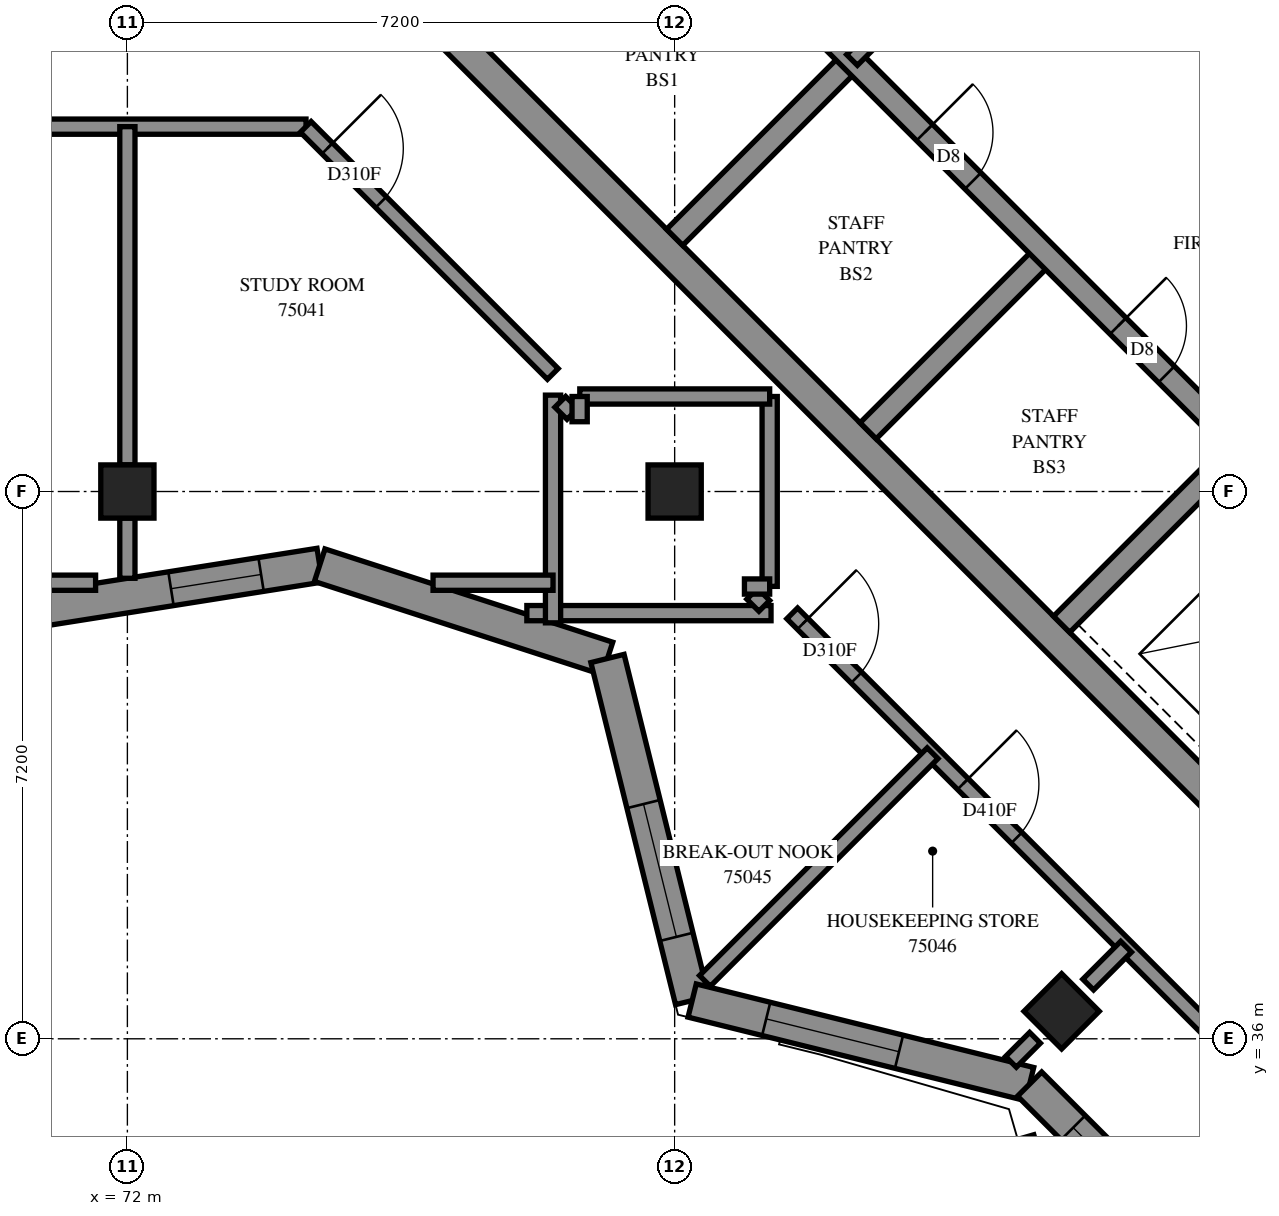
"""IFC4 building model, lengths in metres.
Left out: names, types, materials, properties, quantities, classifications, styles, units other than length and angle.
Written with IfcOpenShell. Run it as: python <this file> out.ifc"""

import sys

from ifc_helpers import new_model, si_unit, direction, frame, frame_2d, origin, origin_2d, place, context, subcontext, project, spatial, polyline, rectangle, outline, extrude, element, fill, save


model = new_model("IFC4")
c1 = context("Model", 3, precision=1e-05, world=origin(), true_north=direction((0.0, 1.0)))
c2 = subcontext(c1, "Body", "Model", "MODEL_VIEW")
j1 = project(units=[si_unit("LENGTHUNIT", "METRE"), si_unit("PLANEANGLEUNIT", "RADIAN")], contexts=[c1])
p1 = place(None, origin())
s1 = spatial("IfcSite", under=j1, at=p1, CompositionType="ELEMENT")
p2 = place(p1, origin())
s2 = spatial("IfcBuilding", under=s1, at=p2, CompositionType="ELEMENT")
p3 = place(p2, frame((0.0, 0.0, 274.4)))
s3 = spatial("IfcBuildingStorey", under=s2, at=p3, CompositionType="ELEMENT", Elevation=274.4)
for number, where, z_axis, x_axis in (
    (1, (72.0, 43.2, 0.0), (0.0, 0.0, 1.0), (1.0, 0.0, 0.0)),
    (2, (79.2, 43.2, 0.0), (0.0, 0.0, 1.0), (1.0, 0.0, 0.0)),
    (3, (84.291, 36.362, 0.0), (0.0, 0.0, 1.0), (0.707, -0.707, 0.0)),
):
    element("IfcColumn", number, at=place(p3, frame(where, z_axis=z_axis, x_axis=x_axis)), inside=s3, PredefinedType="COLUMN", context=c2, shape_type="SweptSolid", body=[
        extrude(rectangle(XDim=0.7, YDim=0.7, at=origin_2d()), origin(), (0.0, 0.0, 1.0), 3.1),
    ])
p4 = place(p3, frame((76.23, 49.231, -0.3), z_axis=(0.0, 0.0, 1.0), x_axis=(0.7071034917, -0.7071100706, 0.0)))
e4 = element("IfcWall", 4, at=p4, inside=s3, PredefinedType="SHEAR", context=c2, shape_type="SweptSolid", body=[
    extrude(rectangle(XDim=15.2, YDim=0.4, at=frame_2d((7.6, 0.0))), origin(), (0.0, 0.0, 1.0), 2.7),
])
p5 = place(p3, frame((79.2, 46.544, 0.0), z_axis=(0.0, 0.0, 1.0), x_axis=(0.7071219326, 0.7070916295, 0.0)))
e5 = element("IfcWall", 5, at=p5, inside=s3, PredefinedType="SOLIDWALL", context=c2, shape_type="SweptSolid", body=[
    extrude(rectangle(XDim=3.3, YDim=0.3, at=frame_2d((1.65, 0.0))), origin(), (0.0, 0.0, 1.0), 3.1),
])
for number, where, z_axis, x_axis in (
    (6, (81.746, 43.999, 0.0), (0.0, 0.0, 1.0), (0.707, 0.707, 0.0)),
    (7, (84.291, 41.453, 0.0), (0.0, 0.0, 1.0), (0.707, 0.707, 0.0)),
):
    element("IfcWall", number, at=place(p3, frame(where, z_axis=z_axis, x_axis=x_axis)), inside=s3, PredefinedType="SOLIDWALL", context=c2, shape_type="SweptSolid", body=[
        extrude(rectangle(XDim=3.3, YDim=0.3, at=frame_2d((1.65, 0.0))), origin(), (0.0, 0.0, 1.0), 3.1),
    ])
p6 = place(p3, frame((78.988, 51.423, 0.0), z_axis=(0.0, 0.0, 1.0), x_axis=(0.7071067812, -0.7071067812, 0.0)))
e8 = element("IfcWall", 8, at=p6, inside=s3, PredefinedType="SOLIDWALL", context=c2, shape_type="SweptSolid", body=[
    extrude(rectangle(XDim=14.4, YDim=0.3, at=frame_2d((7.2, 0.0))), origin(), (0.0, 0.0, 1.0), 3.1),
])
p7 = place(p6, frame((1.35, 0.0, 0.0)))
e9 = element("IfcOpeningElement", 9, at=p7, cuts=e8, PredefinedType="OPENING", context=c2, shape_type="SweptSolid", body=[
    extrude(rectangle(XDim=0.9, YDim=2.1, at=frame_2d((0.45, 1.05))), frame((0.0, 0.16, 0.0), z_axis=(0.0, -1.0, 0.0), x_axis=(1.0, 0.0, 0.0)), (0.0, 0.0, 1.0), 0.32),
])
p8 = place(p6, frame((4.95, 0.0, 0.0)))
e10 = element("IfcOpeningElement", 10, at=p8, cuts=e8, PredefinedType="OPENING", context=c2, shape_type="SweptSolid", body=[
    extrude(rectangle(XDim=0.9, YDim=2.1, at=frame_2d((0.45, 1.05))), frame((0.0, 0.16, 0.0), z_axis=(0.0, -1.0, 0.0), x_axis=(1.0, 0.0, 0.0)), (0.0, 0.0, 1.0), 0.32),
])
p9 = place(p6, frame((8.55, 0.0, 0.0)))
e11 = element("IfcOpeningElement", 11, at=p9, cuts=e8, PredefinedType="OPENING", context=c2, shape_type="SweptSolid", body=[
    extrude(rectangle(XDim=0.9, YDim=2.1, at=frame_2d((0.45, 1.05))), frame((0.0, 0.16, 0.0), z_axis=(0.0, -1.0, 0.0), x_axis=(1.0, 0.0, 0.0)), (0.0, 0.0, 1.0), 0.32),
])
p10 = place(p6, frame((12.05, 0.0, 0.0)))
e12 = element("IfcOpeningElement", 12, at=p10, cuts=e8, PredefinedType="OPENING", context=c2, shape_type="SweptSolid", body=[
    extrude(rectangle(XDim=1.1, YDim=2.1, at=frame_2d((0.55, 1.05))), frame((0.0, 0.16, 0.0), z_axis=(0.0, -1.0, 0.0), x_axis=(1.0, 0.0, 0.0)), (0.0, 0.0, 1.0), 0.32),
])
p11 = place(p3, frame((81.534, 53.969, 0.0), z_axis=(0.0, 0.0, 1.0), x_axis=(0.707103309, -0.7071102534, 0.0)))
e13 = element("IfcWall", 13, at=p11, inside=s3, PredefinedType="SOLIDWALL", context=c2, shape_type="SweptSolid", body=[
    extrude(rectangle(XDim=14.4, YDim=0.3, at=frame_2d((7.2, 0.0))), origin(), (0.0, 0.0, 1.0), 3.1),
])
p12 = place(p11, frame((8.55, 0.0, 0.0)))
e14 = element("IfcOpeningElement", 14, at=p12, cuts=e13, PredefinedType="OPENING", context=c2, shape_type="SweptSolid", body=[
    extrude(rectangle(XDim=0.9, YDim=2.1, at=frame_2d((0.45, 1.05))), frame((0.0, 0.16, 0.0), z_axis=(0.0, -1.0, 0.0), x_axis=(1.0, 0.0, 0.0)), (0.0, 0.0, 1.0), 0.32),
])
p13 = place(p11, frame((1.25, 0.0, 0.0)))
e15 = element("IfcOpeningElement", 15, at=p13, cuts=e13, PredefinedType="OPENING", context=c2, shape_type="SweptSolid", body=[
    extrude(rectangle(XDim=1.1, YDim=2.1, at=frame_2d((0.55, 1.05))), frame((0.0, 0.16, 0.0), z_axis=(0.0, -1.0, 0.0), x_axis=(1.0, 0.0, 0.0)), (0.0, 0.0, 1.0), 0.32),
])
p14 = place(p11, frame((4.85, 0.0, 0.0)))
e16 = element("IfcOpeningElement", 16, at=p14, cuts=e13, PredefinedType="OPENING", context=c2, shape_type="SweptSolid", body=[
    extrude(rectangle(XDim=1.1, YDim=2.1, at=frame_2d((0.55, 1.05))), frame((0.0, 0.16, 0.0), z_axis=(0.0, -1.0, 0.0), x_axis=(1.0, 0.0, 0.0)), (0.0, 0.0, 1.0), 0.32),
])
p15 = place(p11, frame((12.05, 0.0, 0.0)))
e17 = element("IfcOpeningElement", 17, at=p15, cuts=e13, PredefinedType="OPENING", context=c2, shape_type="SweptSolid", body=[
    extrude(rectangle(XDim=1.1, YDim=2.1, at=frame_2d((0.55, 1.05))), frame((0.0, 0.16, 0.0), z_axis=(0.0, -1.0, 0.0), x_axis=(1.0, 0.0, 0.0)), (0.0, 0.0, 1.0), 0.32),
])
p16 = place(p3, frame((70.896, 41.656, 0.0), z_axis=(0.0, 0.0, 1.0), x_axis=(0.9877170854, 0.1562528693, 0.0)))
e18 = element("IfcWall", 18, at=p16, inside=s3, PredefinedType="SOLIDWALL", context=c2, shape_type="SweptSolid", body=[
    extrude(outline(polyline([(-0.036, -0.225), (3.625, -0.225), (3.733, 0.225), (0.036, 0.225), (-0.036, -0.225)])), origin(), (0.0, 0.0, 1.0), 3.1),
])
p17 = place(p16, frame((1.698, 0.0, 0.45)))
e19 = element("IfcOpeningElement", 19, at=p17, cuts=e18, PredefinedType="OPENING", context=c2, shape_type="SweptSolid", body=[
    extrude(rectangle(XDim=1.2, YDim=2.55, at=frame_2d((0.6, 1.275))), frame((0.0, 0.235, 0.0), z_axis=(0.0, -1.0, 0.0), x_axis=(1.0, 0.0, 0.0)), (0.0, 0.0, 1.0), 0.47),
])
p18 = place(p3, frame((74.53, 42.231, 0.0), z_axis=(0.0, 0.0, 1.0), x_axis=(0.9512809881, -0.3083252855, 0.0)))
e20 = element("IfcWall", 20, at=p18, inside=s3, PredefinedType="SOLIDWALL", context=c2, shape_type="SweptSolid", body=[
    extrude(outline(polyline([(0.054, -0.225), (3.855, -0.225), (4.105, 0.225), (-0.054, 0.225), (0.054, -0.225)])), origin(), (0.0, 0.0, 1.0), 3.1),
])
p19 = place(p3, frame((78.316, 41.004, 0.0), z_axis=(0.0, 0.0, 1.0), x_axis=(0.2402612928, -0.9707082523, 0.0)))
e21 = element("IfcWall", 21, at=p19, inside=s3, PredefinedType="SOLIDWALL", context=c2, shape_type="SweptSolid", body=[
    extrude(outline(polyline([(0.125, -0.225), (4.772, -0.225), (4.5, 0.225), (-0.125, 0.225), (0.125, -0.225)])), origin(), (0.0, 0.0, 1.0), 2.6),
])
p20 = place(p19, frame((1.973, 0.0, 0.6)))
e22 = element("IfcOpeningElement", 22, at=p20, cuts=e21, PredefinedType="OPENING", context=c2, shape_type="SweptSolid", body=[
    extrude(rectangle(XDim=1.8, YDim=1.9, at=frame_2d((0.9, 0.95))), frame((0.0, 0.235, 0.0), z_axis=(0.0, -1.0, 0.0), x_axis=(1.0, 0.0, 0.0)), (0.0, 0.0, 1.0), 0.47),
])
p21 = place(p3, frame((79.43, 36.503, 0.0), z_axis=(0.0, 0.0, 1.0), x_axis=(0.9707070317, -0.2402662245, 0.0)))
e23 = element("IfcWall", 23, at=p21, inside=s3, PredefinedType="SOLIDWALL", context=c2, shape_type="SweptSolid", body=[
    extrude(outline(polyline([(-0.136, -0.225), (4.511, -0.225), (4.636, 0.225), (0.136, 0.225), (-0.136, -0.225)])), origin(), (0.0, 0.0, 1.0), 2.6),
])
p22 = place(p21, frame((1.004, 0.0, 0.6)))
e24 = element("IfcOpeningElement", 24, at=p22, cuts=e23, PredefinedType="OPENING", context=c2, shape_type="SweptSolid", body=[
    extrude(rectangle(XDim=1.8, YDim=1.9, at=frame_2d((0.9, 0.95))), frame((0.0, 0.235, 0.0), z_axis=(0.0, -1.0, 0.0), x_axis=(1.0, 0.0, 0.0)), (0.0, 0.0, 1.0), 0.47),
])
p23 = place(p3, frame((83.87, 35.404, 0.0), z_axis=(0.0, 0.0, 1.0), x_axis=(0.7071067812, -0.7071067812, 0.0)))
e25 = element("IfcWall", 25, at=p23, inside=s3, PredefinedType="SOLIDWALL", context=c2, shape_type="SweptSolid", body=[
    extrude(outline(polyline([(0.063, -0.225), (8.021, -0.225), (7.743, 0.225), (-0.063, 0.225), (0.063, -0.225)])), origin(), (0.0, 0.0, 1.0), 3.1),
])
p24 = place(p23, frame((0.81, 0.0, 0.7)))
e26 = element("IfcOpeningElement", 26, at=p24, cuts=e25, PredefinedType="OPENING", context=c2, shape_type="SweptSolid", body=[
    extrude(rectangle(XDim=1.8, YDim=1.8, at=frame_2d((0.9, 0.9))), frame((0.0, 0.235, 0.0), z_axis=(0.0, -1.0, 0.0), x_axis=(1.0, 0.0, 0.0)), (0.0, 0.0, 1.0), 0.47),
])
p25 = place(p23, frame((4.121, 0.0, 0.7)))
e27 = element("IfcOpeningElement", 27, at=p25, cuts=e25, PredefinedType="OPENING", context=c2, shape_type="SweptSolid", body=[
    extrude(rectangle(XDim=1.8, YDim=1.8, at=frame_2d((0.9, 0.9))), frame((0.0, 0.235, 0.0), z_axis=(0.0, -1.0, 0.0), x_axis=(1.0, 0.0, 0.0)), (0.0, 0.0, 1.0), 0.47),
])
p26 = place(p3, frame((81.534, 48.878, 0.0), z_axis=(0.0, 0.0, 1.0), x_axis=(0.707092892, 0.7071206701, 0.0)))
e28 = element("IfcWall", 28, at=p26, inside=s3, PredefinedType="PARTITIONING", context=c2, shape_type="SweptSolid", body=[
    extrude(rectangle(XDim=3.6, YDim=0.2, at=frame_2d((1.8, 0.0))), origin(), (0.0, 0.0, 1.0), 3.1),
])
p27 = place(p3, frame((55.2, 48.0, 0.0), z_axis=(0.0, 0.0, 1.0), x_axis=(1.0, 0.0, 0.0)))
e29 = element("IfcWall", 29, at=p27, inside=s3, PredefinedType="PARTITIONING", context=c2, shape_type="SweptSolid", body=[
    extrude(rectangle(XDim=19.15, YDim=0.2, at=frame_2d((9.575, 0.0))), origin(), (0.0, 0.0, 1.0), 3.1),
])
p28 = place(p27, frame((6.261, 0.0, 0.0)))
e30 = element("IfcOpeningElement", 30, at=p28, cuts=e29, PredefinedType="OPENING", context=c2, shape_type="SweptSolid", body=[
    extrude(rectangle(XDim=0.9, YDim=2.1, at=frame_2d((0.45, 1.05))), frame((0.0, 0.11, 0.0), z_axis=(0.0, -1.0, 0.0), x_axis=(1.0, 0.0, 0.0)), (0.0, 0.0, 1.0), 0.22),
])
p29 = place(p27, frame((13.499, 0.0, 0.0)))
e31 = element("IfcOpeningElement", 31, at=p29, cuts=e29, PredefinedType="OPENING", context=c2, shape_type="SweptSolid", body=[
    extrude(rectangle(XDim=0.9, YDim=2.1, at=frame_2d((0.45, 1.05))), frame((0.0, 0.11, 0.0), z_axis=(0.0, -1.0, 0.0), x_axis=(1.0, 0.0, 0.0)), (0.0, 0.0, 1.0), 0.22),
])
p30 = place(p3, frame((80.747, 41.597, 0.0), z_axis=(0.0, 0.0, 1.0), x_axis=(0.7071067812, -0.7071067812, 0.0)))
e32 = element("IfcWall", 32, at=p30, inside=s3, PredefinedType="PARTITIONING", context=c2, shape_type="SweptSolid", body=[
    extrude(rectangle(XDim=8.607, YDim=0.2, at=frame_2d((4.303, 0.0))), origin(), (0.0, 0.0, 1.0), 3.1),
])
p31 = place(p30, frame((0.195, 0.0, 0.0)))
e33 = element("IfcOpeningElement", 33, at=p31, cuts=e32, PredefinedType="OPENING", context=c2, shape_type="SweptSolid", body=[
    extrude(rectangle(XDim=1.0, YDim=2.1, at=frame_2d((0.5, 1.05))), frame((0.0, 0.11, 0.0), z_axis=(0.0, -1.0, 0.0), x_axis=(1.0, 0.0, 0.0)), (0.0, 0.0, 1.0), 0.22),
])
p32 = place(p30, frame((3.175, 0.0, 0.0)))
e34 = element("IfcOpeningElement", 34, at=p32, cuts=e32, PredefinedType="OPENING", context=c2, shape_type="SweptSolid", body=[
    extrude(rectangle(XDim=1.0, YDim=2.1, at=frame_2d((0.5, 1.05))), frame((0.0, 0.11, 0.0), z_axis=(0.0, -1.0, 0.0), x_axis=(1.0, 0.0, 0.0)), (0.0, 0.0, 1.0), 0.22),
])
p33 = place(p3, frame((74.347, 47.997, 0.0), z_axis=(0.0, 0.0, 1.0), x_axis=(0.7071067812, -0.7071067812, 0.0)))
e35 = element("IfcWall", 35, at=p33, inside=s3, PredefinedType="PARTITIONING", context=c2, shape_type="SweptSolid", body=[
    extrude(rectangle(XDim=4.596, YDim=0.2, at=frame_2d((2.298, 0.0))), origin(), (0.0, 0.0, 1.0), 3.1),
])
p34 = place(p33, frame((0.401, 0.0, 0.0)))
e36 = element("IfcOpeningElement", 36, at=p34, cuts=e35, PredefinedType="OPENING", context=c2, shape_type="SweptSolid", body=[
    extrude(rectangle(XDim=1.0, YDim=2.1, at=frame_2d((0.5, 1.05))), frame((0.0, 0.11, 0.0), z_axis=(0.0, -1.0, 0.0), x_axis=(1.0, 0.0, 0.0)), (0.0, 0.0, 1.0), 0.22),
])
p35 = place(p3, frame((72.0, 43.55, 0.0), z_axis=(0.0, 0.0, 1.0), x_axis=(0.0, 1.0, 0.0)))
e37 = element("IfcWall", 37, at=p35, inside=s3, PredefinedType="PARTITIONING", context=c2, shape_type="SweptSolid", body=[
    extrude(rectangle(XDim=4.45, YDim=0.2, at=frame_2d((2.225, 0.0))), origin(), (0.0, 0.0, 1.0), 3.1),
])
p36 = place(p3, frame((79.598, 36.761, 0.0), z_axis=(0.0, 0.0, 1.0), x_axis=(0.7071067812, 0.7071067812, 0.0)))
e38 = element("IfcWall", 38, at=p36, inside=s3, PredefinedType="PARTITIONING", context=c2, shape_type="SweptSolid", body=[
    extrude(rectangle(XDim=4.236, YDim=0.2, at=frame_2d((2.118, 0.0))), origin(), (0.0, 0.0, 1.0), 3.1),
])
p37 = place(p3, frame((77.255, 41.6, 0.0), z_axis=(0.0, 0.0, 1.0), x_axis=(1.0, 0.0, 0.0)))
e39 = element("IfcWall", 39, at=p37, inside=s3, PredefinedType="PARTITIONING", context=c2, shape_type="SweptSolid", body=[
    extrude(rectangle(XDim=3.212, YDim=0.2, at=frame_2d((1.606, 0.0))), origin(), (0.0, 0.0, 1.0), 2.6),
])
p38 = place(p3, frame((77.6, 41.472, 0.0), z_axis=(0.0, 0.0, 1.0), x_axis=(0.0, 1.0, 0.0)))
e40 = element("IfcWall", 40, at=p38, inside=s3, PredefinedType="PARTITIONING", context=c2, shape_type="SweptSolid", body=[
    extrude(rectangle(XDim=2.996, YDim=0.2, at=frame_2d((1.498, 0.0))), origin(), (0.0, 0.0, 1.0), 3.1),
])
for number, where, z_axis, x_axis in (
    (41, (80.45, 41.952, 0.0), (0.0, 0.0, 1.0), (0.0, 1.0, 0.0)),
    (42, (77.952, 44.45, 0.0), (0.0, 0.0, 1.0), (1.0, 0.0, 0.0)),
):
    element("IfcWall", number, at=place(p3, frame(where, z_axis=z_axis, x_axis=x_axis)), inside=s3, PredefinedType="PARTITIONING", context=c2, shape_type="SweptSolid", body=[
        extrude(rectangle(XDim=2.498, YDim=0.2, at=frame_2d((1.249, 0.0))), origin(), (0.0, 0.0, 1.0), 3.1),
    ])
p39 = place(p3, frame((76.021, 42.0, 0.0), z_axis=(0.0, 0.0, 1.0), x_axis=(1.0, 0.0, 0.0)))
e43 = element("IfcWall", 43, at=p39, inside=s3, PredefinedType="PARTITIONING", context=c2, shape_type="SweptSolid", body=[
    extrude(rectangle(XDim=1.579, YDim=0.2, at=frame_2d((0.789, 0.0))), origin(), (0.0, 0.0, 1.0), 3.1),
])
p40 = place(p3, frame((70.21, 42.0, 0.0), z_axis=(0.0, 0.0, 1.0), x_axis=(1.0, 0.0, 0.0)))
e44 = element("IfcWall", 44, at=p40, inside=s3, PredefinedType="PARTITIONING", context=c2, shape_type="SweptSolid", body=[
    extrude(rectangle(XDim=1.372, YDim=0.2, at=frame_2d((0.686, 0.0))), origin(), (0.0, 0.0, 1.0), 3.1),
])
p41 = place(p3, frame((72.0, 42.058, 0.0), z_axis=(0.0, 0.0, 1.0), x_axis=(0.0, 1.0, 0.0)))
e45 = element("IfcWall", 45, at=p41, inside=s3, PredefinedType="PARTITIONING", context=c2, shape_type="SweptSolid", body=[
    extrude(rectangle(XDim=0.792, YDim=0.2, at=frame_2d((0.396, 0.0))), origin(), (0.0, 0.0, 1.0), 3.1),
])
p42 = place(p3, frame((84.641, 36.713, 0.0), z_axis=(0.0, 0.0, 1.0), x_axis=(0.7071067812, 0.7071067812, 0.0)))
e46 = element("IfcWall", 46, at=p42, inside=s3, PredefinedType="PARTITIONING", context=c2, shape_type="SweptSolid", body=[
    extrude(rectangle(XDim=0.704, YDim=0.2, at=frame_2d((0.352, 0.0))), origin(), (0.0, 0.0, 1.0), 3.1),
])
for number, where, z_axis, x_axis in (
    (47, (80.221, 41.855, 0.0), (0.0, 0.0, 1.0), (0.707, -0.707, 0.0)),
    (48, (77.695, 44.38, 0.0), (0.0, 0.0, 1.0), (0.707, -0.707, 0.0)),
):
    element("IfcWall", number, at=place(p3, frame(where, z_axis=z_axis, x_axis=x_axis)), inside=s3, PredefinedType="PARTITIONING", context=c2, shape_type="SweptSolid", body=[
        extrude(rectangle(XDim=0.225, YDim=0.2, at=frame_2d((0.112, 0.0))), origin(), (0.0, 0.0, 1.0), 3.1),
    ])
p43 = place(p3, frame((83.624, 35.697, 0.0), z_axis=(0.0, 0.0, 1.0), x_axis=(0.7069950475, 0.7072184972, 0.0)))
e49 = element("IfcWall", 49, at=p43, inside=s3, PredefinedType="PARTITIONING", context=c2, shape_type="SweptSolid", body=[
    extrude(rectangle(XDim=0.448, YDim=0.2, at=frame_2d((0.224, 0.0))), origin(), (0.0, 0.0, 1.0), 2.6),
])
for number, where, z_axis, x_axis in (
    (50, (80.118, 41.95, 0.0), (0.0, 0.0, 1.0), (1.0, 0.0, 0.0)),
    (51, (77.95, 44.118, 0.0), (0.0, 0.0, 1.0), (0.0, 1.0, 0.0)),
):
    element("IfcWall", number, at=place(p3, frame(where, z_axis=z_axis, x_axis=x_axis)), inside=s3, PredefinedType="PARTITIONING", context=c2, shape_type="SweptSolid", body=[
        extrude(rectangle(XDim=0.332, YDim=0.2, at=frame_2d((0.166, 0.0))), origin(), (0.0, 0.0, 1.0), 3.1),
    ])
p44 = place(p3, frame((84.979, 30.731, 0.0), z_axis=(0.0, 0.0, 1.0), x_axis=(-0.2777555576, 0.9606517841, 0.0)))
e52 = element("IfcWall", 52, at=p44, inside=s3, PredefinedType="PARAPET", context=c2, shape_type="SweptSolid", body=[
    extrude(rectangle(XDim=4.142, YDim=0.2, at=frame_2d((2.071, 0.0))), origin(), (0.0, 0.0, 1.0), 0.2),
])
p45 = place(p17, origin())
e53 = element("IfcWindow", 53, at=p45, inside=s3, PartitioningType="SINGLE_PANEL", PredefinedType="WINDOW", context=c2, shape_type="SweptSolid", body=[
    extrude(rectangle(XDim=1.2, YDim=2.55, at=frame_2d((0.6, 1.275))), frame((0.0, 0.205, 0.0), z_axis=(0.0, -1.0, 0.0), x_axis=(1.0, 0.0, 0.0)), (0.0, 0.0, 1.0), 0.06),
])
fill(e19, e53)
p46 = place(p20, origin())
e54 = element("IfcWindow", 54, at=p46, inside=s3, PartitioningType="SINGLE_PANEL", PredefinedType="WINDOW", context=c2, shape_type="SweptSolid", body=[
    extrude(rectangle(XDim=1.8, YDim=1.9, at=frame_2d((0.9, 0.95))), frame((0.0, 0.205, 0.0), z_axis=(0.0, -1.0, 0.0), x_axis=(1.0, 0.0, 0.0)), (0.0, 0.0, 1.0), 0.06),
])
fill(e22, e54)
p47 = place(p22, origin())
e55 = element("IfcWindow", 55, at=p47, inside=s3, PartitioningType="SINGLE_PANEL", PredefinedType="WINDOW", context=c2, shape_type="SweptSolid", body=[
    extrude(rectangle(XDim=1.8, YDim=1.9, at=frame_2d((0.9, 0.95))), frame((0.0, 0.205, 0.0), z_axis=(0.0, -1.0, 0.0), x_axis=(1.0, 0.0, 0.0)), (0.0, 0.0, 1.0), 0.06),
])
fill(e24, e55)
p48 = place(p24, origin())
e56 = element("IfcWindow", 56, at=p48, inside=s3, PartitioningType="SINGLE_PANEL", PredefinedType="WINDOW", context=c2, shape_type="SweptSolid", body=[
    extrude(rectangle(XDim=1.8, YDim=1.8, at=frame_2d((0.9, 0.9))), frame((0.0, 0.205, 0.0), z_axis=(0.0, -1.0, 0.0), x_axis=(1.0, 0.0, 0.0)), (0.0, 0.0, 1.0), 0.06),
])
fill(e26, e56)
p49 = place(p8, origin())
e57 = element("IfcDoor", 57, at=p49, inside=s3, OperationType="SINGLE_SWING_LEFT", PredefinedType="DOOR", context=c2, shape_type="SweptSolid", body=[
    extrude(rectangle(XDim=0.9, YDim=2.1, at=frame_2d((0.45, 1.05))), frame((0.0, 0.025, 0.0), z_axis=(0.0, -1.0, 0.0), x_axis=(1.0, 0.0, 0.0)), (0.0, 0.0, 1.0), 0.05),
])
fill(e10, e57)
p50 = place(p9, origin())
e58 = element("IfcDoor", 58, at=p50, inside=s3, OperationType="SINGLE_SWING_LEFT", PredefinedType="DOOR", context=c2, shape_type="SweptSolid", body=[
    extrude(rectangle(XDim=0.9, YDim=2.1, at=frame_2d((0.45, 1.05))), frame((0.0, 0.025, 0.0), z_axis=(0.0, -1.0, 0.0), x_axis=(1.0, 0.0, 0.0)), (0.0, 0.0, 1.0), 0.05),
])
fill(e11, e58)
p51 = place(p34, origin())
e59 = element("IfcDoor", 59, at=p51, inside=s3, OperationType="SINGLE_SWING_LEFT", PredefinedType="DOOR", context=c2, shape_type="SweptSolid", body=[
    extrude(rectangle(XDim=1.0, YDim=2.1, at=frame_2d((0.5, 1.05))), frame((0.0, 0.025, 0.0), z_axis=(0.0, -1.0, 0.0), x_axis=(1.0, 0.0, 0.0)), (0.0, 0.0, 1.0), 0.05),
])
fill(e36, e59)
p52 = place(p31, origin())
e60 = element("IfcDoor", 60, at=p52, inside=s3, OperationType="SINGLE_SWING_LEFT", PredefinedType="DOOR", context=c2, shape_type="SweptSolid", body=[
    extrude(rectangle(XDim=1.0, YDim=2.1, at=frame_2d((0.5, 1.05))), frame((0.0, 0.025, 0.0), z_axis=(0.0, -1.0, 0.0), x_axis=(1.0, 0.0, 0.0)), (0.0, 0.0, 1.0), 0.05),
])
fill(e33, e60)
p53 = place(p32, origin())
e61 = element("IfcDoor", 61, at=p53, inside=s3, OperationType="SINGLE_SWING_LEFT", PredefinedType="DOOR", context=c2, shape_type="SweptSolid", body=[
    extrude(rectangle(XDim=1.0, YDim=2.1, at=frame_2d((0.5, 1.05))), frame((0.0, 0.025, 0.0), z_axis=(0.0, -1.0, 0.0), x_axis=(1.0, 0.0, 0.0)), (0.0, 0.0, 1.0), 0.05),
])
fill(e34, e61)
save(model, sys.argv[1])
